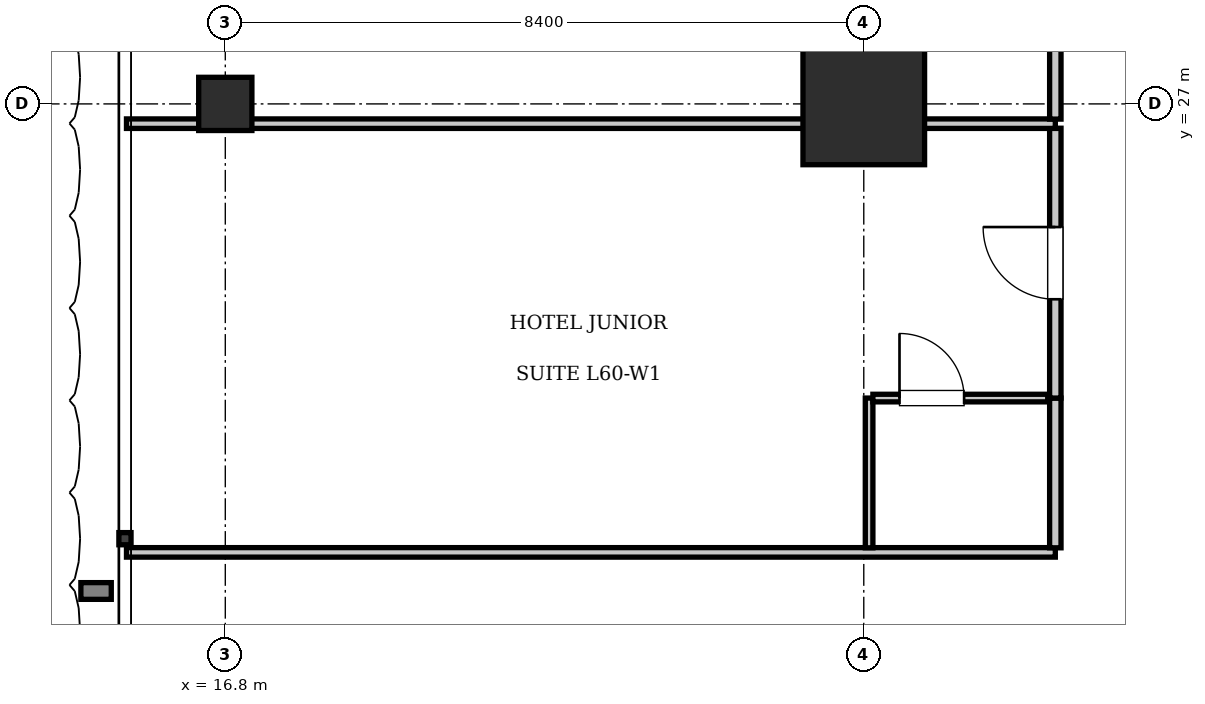
"""IFC4 building model, lengths in metres.
Left out: names, types, materials, properties, quantities, classifications, styles, units other than length and angle.
Written with IfcOpenShell. Run it as: python <this file> out.ifc"""

import sys

from ifc_helpers import new_model, si_unit, direction, frame, frame_2d, origin, origin_2d, place, context, subcontext, project, spatial, rectangle, extrude, element, fill, save


model = new_model("IFC4")
c1 = context("Model", 3, precision=1e-05, world=origin(), true_north=direction((0.0, 1.0)))
c2 = subcontext(c1, "Body", "Model", "MODEL_VIEW")
j1 = project(units=[si_unit("LENGTHUNIT", "METRE"), si_unit("PLANEANGLEUNIT", "RADIAN")], contexts=[c1])
p1 = place(None, origin())
s1 = spatial("IfcSite", under=j1, at=p1, CompositionType="ELEMENT")
p2 = place(p1, origin())
s2 = spatial("IfcBuilding", under=s1, at=p2, CompositionType="ELEMENT")
p3 = place(p2, frame((0.0, 0.0, 247.1)))
s3 = spatial("IfcBuildingStorey", under=s2, at=p3, CompositionType="ELEMENT", Elevation=247.1)
p4 = place(p3, frame((25.2, 27.0, 0.0), z_axis=(0.0, 0.0, 1.0), x_axis=(1.0, 0.0, 0.0)))
e1 = element("IfcColumn", 1, at=p4, inside=s3, PredefinedType="COLUMN", context=c2, shape_type="SweptSolid", body=[
    extrude(rectangle(XDim=1.6, YDim=1.6, at=origin_2d()), origin(), (0.0, 0.0, 1.0), 3.85),
])
p5 = place(p3, frame((16.8, 27.0, 0.0), z_axis=(0.0, 0.0, 1.0), x_axis=(1.0, 0.0, 0.0)))
e2 = element("IfcColumn", 2, at=p5, inside=s3, PredefinedType="COLUMN", context=c2, shape_type="SweptSolid", body=[
    extrude(rectangle(XDim=0.7, YDim=0.7, at=origin_2d()), origin(), (0.0, 0.0, 1.0), 3.85),
])
p6 = place(p3, frame((15.5, 21.1, 0.0), z_axis=(0.0, 0.0, 1.0), x_axis=(1.0, 0.0, 0.0)))
e3 = element("IfcWall", 3, at=p6, inside=s3, PredefinedType="PARTITIONING", context=c2, shape_type="SweptSolid", body=[
    extrude(rectangle(XDim=12.22, YDim=0.125, at=frame_2d((6.11, 0.0))), origin(), (0.0, 0.0, 1.0), 3.61),
])
p7 = place(p3, frame((27.72, 21.16, 0.0), z_axis=(0.0, 0.0, 1.0), x_axis=(0.0, 1.0, 0.0)))
e4 = element("IfcWall", 4, at=p7, inside=s3, PredefinedType="PARTITIONING", context=c2, shape_type="SweptSolid", body=[
    extrude(rectangle(XDim=1.97, YDim=0.15, at=frame_2d((0.985, 0.0))), origin(), (0.0, 0.0, 1.0), 3.61),
])
p8 = place(p3, frame((27.72, 23.13, 0.0), z_axis=(0.0, 0.0, 1.0), x_axis=(0.0, 1.0, 0.0)))
e5 = element("IfcWall", 5, at=p8, inside=s3, PredefinedType="PARTITIONING", context=c2, shape_type="SweptSolid", body=[
    extrude(rectangle(XDim=3.55, YDim=0.15, at=frame_2d((1.775, 0.0))), origin(), (0.0, 0.0, 1.0), 3.61),
])
p9 = place(p8, frame((1.3, 0.0, 0.0)))
e6 = element("IfcOpeningElement", 6, at=p9, cuts=e5, PredefinedType="OPENING", context=c2, shape_type="SweptSolid", body=[
    extrude(rectangle(XDim=0.95, YDim=2.15, at=frame_2d((0.475, 1.075))), frame((0.0, 0.085, 0.0), z_axis=(0.0, -1.0, 0.0), x_axis=(1.0, 0.0, 0.0)), (0.0, 0.0, 1.0), 0.17),
])
p10 = place(p3, frame((25.27, 21.16, 0.0), z_axis=(0.0, 0.0, 1.0), x_axis=(0.0, 1.0, 0.0)))
e7 = element("IfcWall", 7, at=p10, inside=s3, PredefinedType="PARTITIONING", context=c2, shape_type="SweptSolid", body=[
    extrude(rectangle(XDim=1.97, YDim=0.1, at=frame_2d((0.985, 0.0))), origin(), (0.0, 0.0, 1.0), 3.077),
])
p11 = place(p3, frame((25.32, 23.13, 0.0), z_axis=(0.0, 0.0, 1.0), x_axis=(1.0, 0.0, 0.0)))
e8 = element("IfcWall", 8, at=p11, inside=s3, PredefinedType="PARTITIONING", context=c2, shape_type="SweptSolid", body=[
    extrude(rectangle(XDim=2.3, YDim=0.1, at=frame_2d((1.15, 0.0))), origin(), (0.0, 0.0, 1.0), 3.61),
])
p12 = place(p11, frame((0.35, 0.0, 0.0)))
e9 = element("IfcOpeningElement", 9, at=p12, cuts=e8, PredefinedType="OPENING", context=c2, shape_type="SweptSolid", body=[
    extrude(rectangle(XDim=0.85, YDim=2.1, at=frame_2d((0.425, 1.05))), frame((0.0, 0.06, 0.0), z_axis=(0.0, -1.0, 0.0), x_axis=(1.0, 0.0, 0.0)), (0.0, 0.0, 1.0), 0.12),
])
p13 = place(p3, frame((15.5, 26.74, 0.0), z_axis=(0.0, 0.0, 1.0), x_axis=(1.0, 0.0, 0.0)))
e10 = element("IfcWall", 10, at=p13, inside=s3, PredefinedType="PARTITIONING", context=c2, shape_type="SweptSolid", body=[
    extrude(rectangle(XDim=12.22, YDim=0.125, at=frame_2d((6.11, 0.0))), origin(), (0.0, 0.0, 1.0), 2.41),
])
p14 = place(p3, frame((27.72, 26.8, 0.0), z_axis=(0.0, 0.0, 1.0), x_axis=(0.0, 1.0, 0.0)))
e11 = element("IfcWall", 11, at=p14, inside=s3, PredefinedType="PARTITIONING", context=c2, shape_type="SweptSolid", body=[
    extrude(rectangle(XDim=3.55, YDim=0.15, at=frame_2d((1.775, 0.0))), origin(), (0.0, 0.0, 1.0), 3.61),
])
p15 = place(p14, frame((1.3, 0.0, 0.0)))
e12 = element("IfcOpeningElement", 12, at=p15, cuts=e11, PredefinedType="OPENING", context=c2, shape_type="SweptSolid", body=[
    extrude(rectangle(XDim=0.95, YDim=2.15, at=frame_2d((0.475, 1.075))), frame((0.0, 0.085, 0.0), z_axis=(0.0, -1.0, 0.0), x_axis=(1.0, 0.0, 0.0)), (0.0, 0.0, 1.0), 0.17),
])
p16 = place(p12, origin())
e13 = element("IfcDoor", 13, at=p16, inside=s3, OperationType="SINGLE_SWING_LEFT", PredefinedType="DOOR", context=c2, shape_type="SweptSolid", body=[
    extrude(rectangle(XDim=0.85, YDim=2.1, at=frame_2d((0.425, 1.05))), frame((0.0, 0.025, 0.0), z_axis=(0.0, -1.0, 0.0), x_axis=(1.0, 0.0, 0.0)), (0.0, 0.0, 1.0), 0.05),
])
fill(e9, e13)
p17 = place(p9, origin())
e14 = element("IfcDoor", 14, at=p17, inside=s3, OperationType="SINGLE_SWING_RIGHT", PredefinedType="DOOR", context=c2, shape_type="SweptSolid", body=[
    extrude(rectangle(XDim=0.95, YDim=2.15, at=frame_2d((0.475, 1.075))), frame((0.0, 0.025, 0.0), z_axis=(0.0, -1.0, 0.0), x_axis=(1.0, 0.0, 0.0)), (0.0, 0.0, 1.0), 0.05),
])
fill(e6, e14)
save(model, sys.argv[1])
